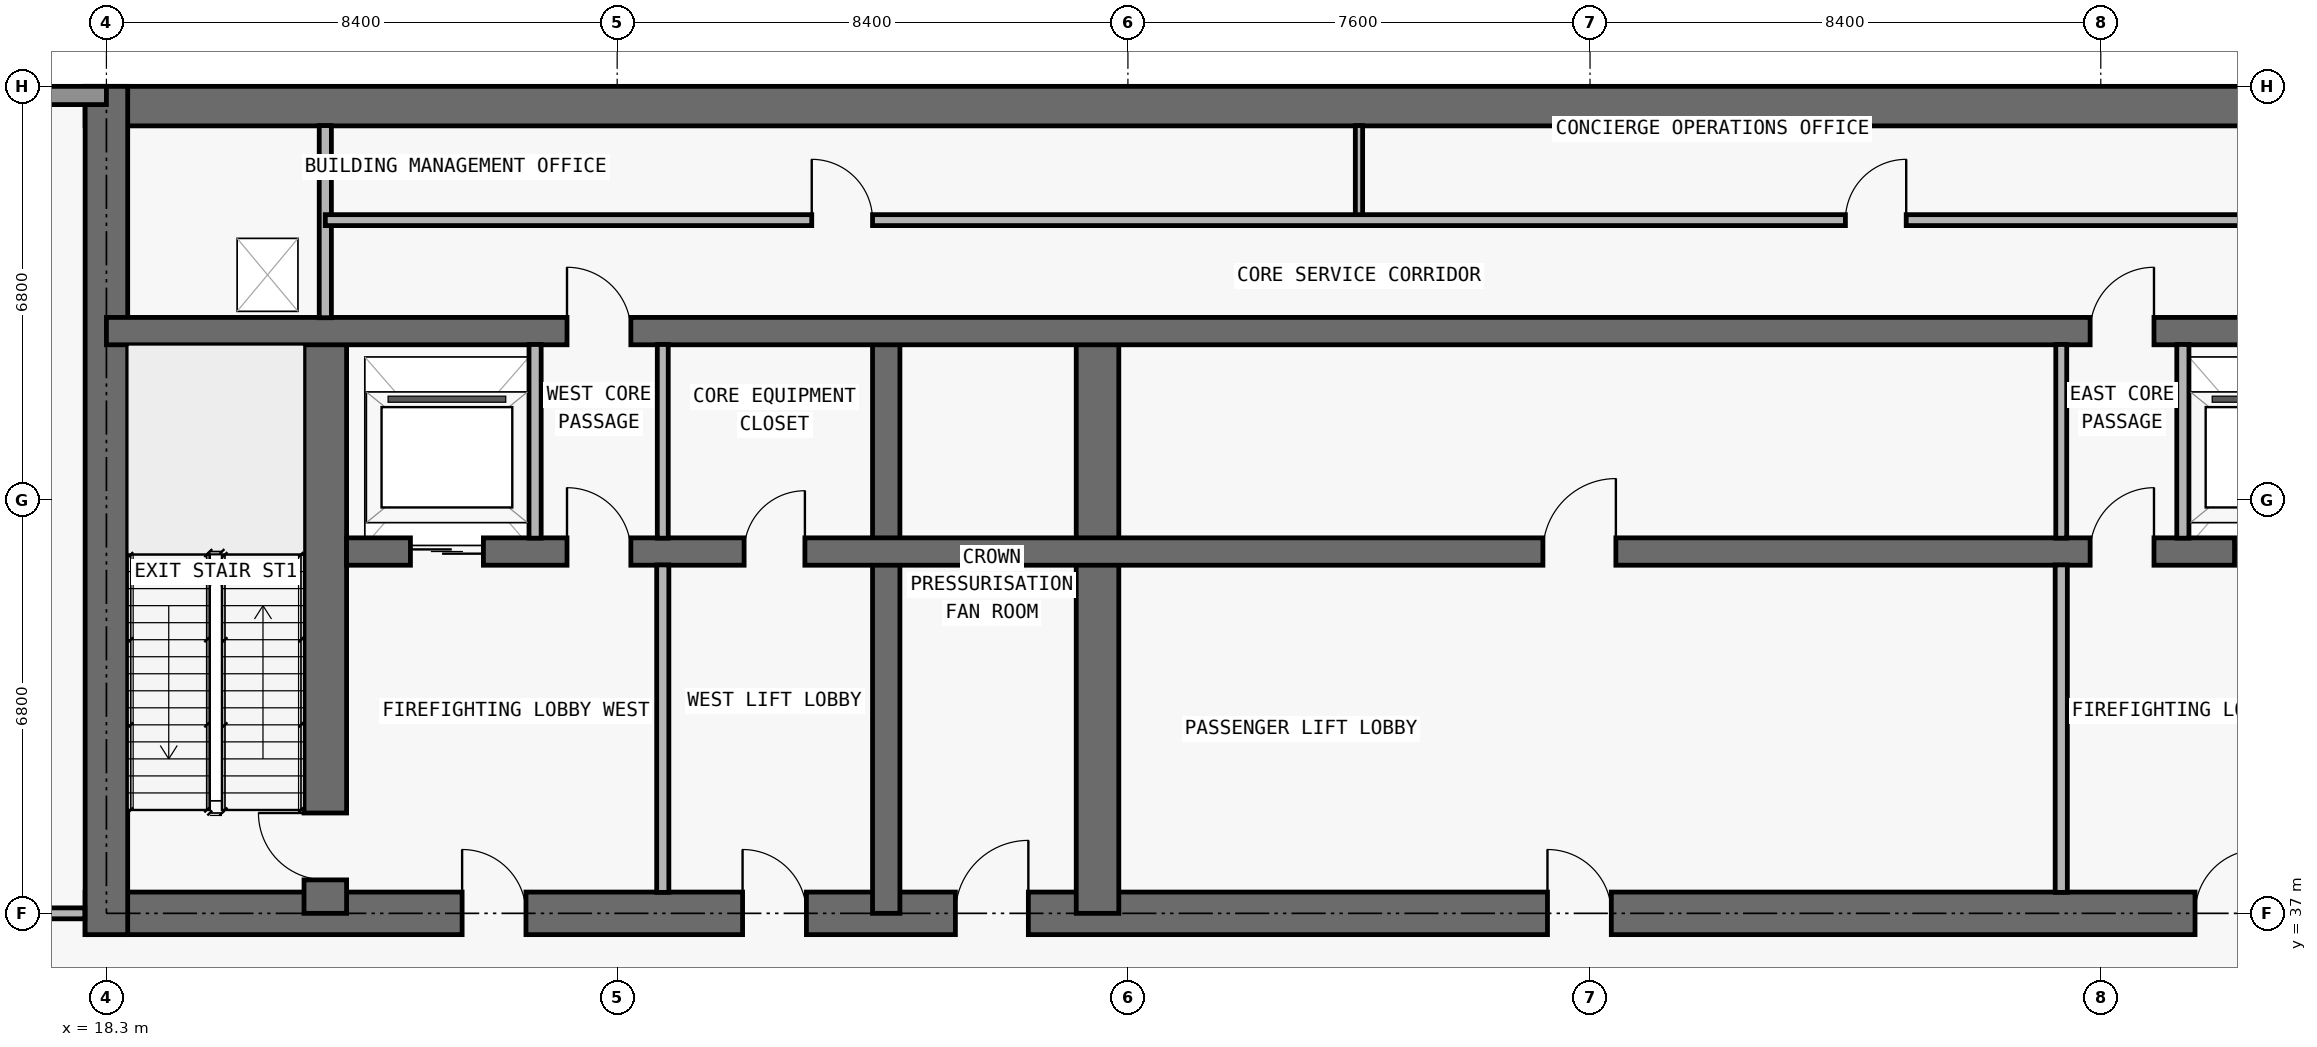
"""IFC4 building model, lengths in metres.
Left out: names, types, materials, properties, quantities, classifications, styles, units other than length and angle.
Written with IfcOpenShell. Run it as: python <this file> out.ifc"""

import sys

from ifc_helpers import new_model, si_unit, direction, frame, frame_2d, origin, place, context, subcontext, project, spatial, rectangle, extrude, element, fill, save


model = new_model("IFC4")
c1 = context("Model", 3, precision=1e-05, world=origin(), true_north=direction((0.0, 1.0)))
c2 = subcontext(c1, "Body", "Model", "MODEL_VIEW")
j1 = project(units=[si_unit("LENGTHUNIT", "METRE"), si_unit("PLANEANGLEUNIT", "RADIAN")], contexts=[c1])
p1 = place(None, origin())
s1 = spatial("IfcSite", under=j1, at=p1, CompositionType="ELEMENT")
p2 = place(p1, origin())
s2 = spatial("IfcBuilding", under=s1, at=p2, CompositionType="ELEMENT")
p3 = place(p2, frame((0.0, 0.0, 284.8)))
s3 = spatial("IfcBuildingStorey", under=s2, at=p3, CompositionType="ELEMENT", Elevation=284.8)
p4 = place(p3, frame((17.95, 37.0, 0.0), z_axis=(0.0, 0.0, 1.0), x_axis=(1.0, 0.0, 0.0)))
e1 = element("IfcWall", 1, at=p4, inside=s3, PredefinedType="SHEAR", context=c2, shape_type="SweptSolid", body=[
    extrude(rectangle(XDim=41.9, YDim=0.7, at=frame_2d((20.95, 0.0))), origin(), (0.0, 0.0, 1.0), 5.1),
])
p5 = place(p4, frame((14.312, 0.0, 0.0)))
e2 = element("IfcOpeningElement", 2, at=p5, cuts=e1, PredefinedType="OPENING", context=c2, shape_type="SweptSolid", body=[
    extrude(rectangle(XDim=1.2, YDim=2.2, at=frame_2d((0.6, 1.1))), frame((0.0, 0.36, 0.0), z_axis=(0.0, -1.0, 0.0), x_axis=(1.0, 0.0, 0.0)), (0.0, 0.0, 1.0), 0.72),
])
p6 = place(p4, frame((6.2, 0.0, 0.0)))
e3 = element("IfcOpeningElement", 3, at=p6, cuts=e1, PredefinedType="OPENING", context=c2, shape_type="SweptSolid", body=[
    extrude(rectangle(XDim=1.05, YDim=2.15, at=frame_2d((0.525, 1.075))), frame((0.0, 0.36, 0.0), z_axis=(0.0, -1.0, 0.0), x_axis=(1.0, 0.0, 0.0)), (0.0, 0.0, 1.0), 0.72),
])
p7 = place(p4, frame((34.7, 0.0, 0.0)))
e4 = element("IfcOpeningElement", 4, at=p7, cuts=e1, PredefinedType="OPENING", context=c2, shape_type="SweptSolid", body=[
    extrude(rectangle(XDim=1.05, YDim=2.15, at=frame_2d((0.525, 1.075))), frame((0.0, 0.36, 0.0), z_axis=(0.0, -1.0, 0.0), x_axis=(1.0, 0.0, 0.0)), (0.0, 0.0, 1.0), 0.72),
])
p8 = place(p4, frame((10.812, 0.0, 0.0)))
e5 = element("IfcOpeningElement", 5, at=p8, cuts=e1, PredefinedType="OPENING", context=c2, shape_type="SweptSolid", body=[
    extrude(rectangle(XDim=1.05, YDim=2.15, at=frame_2d((0.525, 1.075))), frame((0.0, 0.36, 0.0), z_axis=(0.0, -1.0, 0.0), x_axis=(1.0, 0.0, 0.0)), (0.0, 0.0, 1.0), 0.72),
])
p9 = place(p4, frame((24.05, 0.0, 0.0)))
e6 = element("IfcOpeningElement", 6, at=p9, cuts=e1, PredefinedType="OPENING", context=c2, shape_type="SweptSolid", body=[
    extrude(rectangle(XDim=1.05, YDim=2.15, at=frame_2d((0.525, 1.075))), frame((0.0, 0.36, 0.0), z_axis=(0.0, -1.0, 0.0), x_axis=(1.0, 0.0, 0.0)), (0.0, 0.0, 1.0), 0.72),
])
p10 = place(p3, frame((17.95, 50.275, 0.0), z_axis=(0.0, 0.0, 1.0), x_axis=(1.0, 0.0, 0.0)))
e7 = element("IfcWall", 7, at=p10, inside=s3, PredefinedType="SHEAR", context=c2, shape_type="SweptSolid", body=[
    extrude(rectangle(XDim=41.9, YDim=0.65, at=frame_2d((20.95, 0.0))), origin(), (0.0, 0.0, 1.0), 5.1),
])
p11 = place(p3, frame((18.3, 36.65, 0.0), z_axis=(0.0, 0.0, 1.0), x_axis=(0.0, 1.0, 0.0)))
e8 = element("IfcWall", 8, at=p11, inside=s3, PredefinedType="SHEAR", context=c2, shape_type="SweptSolid", body=[
    extrude(rectangle(XDim=13.95, YDim=0.7, at=frame_2d((6.975, 0.0))), origin(), (0.0, 0.0, 1.0), 5.1),
])
p12 = place(p3, frame((21.9, 37.0, 0.0), z_axis=(0.0, 0.0, 1.0), x_axis=(0.0, 1.0, 0.0)))
e9 = element("IfcWall", 9, at=p12, inside=s3, PredefinedType="SHEAR", context=c2, shape_type="SweptSolid", body=[
    extrude(rectangle(XDim=9.575, YDim=0.7, at=frame_2d((4.788, 0.0))), origin(), (0.0, 0.0, 1.0), 5.1),
])
p13 = place(p12, frame((0.55, 0.0, 0.0)))
e10 = element("IfcOpeningElement", 10, at=p13, cuts=e9, PredefinedType="OPENING", context=c2, shape_type="SweptSolid", body=[
    extrude(rectangle(XDim=1.1, YDim=2.15, at=frame_2d((0.55, 1.075))), frame((0.0, 0.36, 0.0), z_axis=(0.0, -1.0, 0.0), x_axis=(1.0, 0.0, 0.0)), (0.0, 0.0, 1.0), 0.72),
])
p14 = place(p3, frame((31.125, 37.0, 0.0), z_axis=(0.0, 0.0, 1.0), x_axis=(0.0, 1.0, 0.0)))
e11 = element("IfcWall", 11, at=p14, inside=s3, PredefinedType="SHEAR", context=c2, shape_type="SweptSolid", body=[
    extrude(rectangle(XDim=9.575, YDim=0.45, at=frame_2d((4.788, 0.0))), origin(), (0.0, 0.0, 1.0), 5.1),
])
p15 = place(p3, frame((34.6, 37.0, 0.0), z_axis=(0.0, 0.0, 1.0), x_axis=(0.0, 1.0, 0.0)))
e12 = element("IfcWall", 12, at=p15, inside=s3, PredefinedType="SHEAR", context=c2, shape_type="SweptSolid", body=[
    extrude(rectangle(XDim=9.575, YDim=0.7, at=frame_2d((4.788, 0.0))), origin(), (0.0, 0.0, 1.0), 5.1),
])
p16 = place(p3, frame((22.25, 42.95, 0.0), z_axis=(0.0, 0.0, 1.0), x_axis=(1.0, 0.0, 0.0)))
e13 = element("IfcWall", 13, at=p16, inside=s3, PredefinedType="SHEAR", context=c2, shape_type="SweptSolid", body=[
    extrude(rectangle(XDim=33.3, YDim=0.45, at=frame_2d((16.65, 0.0))), origin(), (0.0, 0.0, 1.0), 5.1),
])
p17 = place(p16, frame((1.05, 0.0, 0.0)))
e14 = element("IfcOpeningElement", 14, at=p17, cuts=e13, PredefinedType="OPENING", context=c2, shape_type="SweptSolid", body=[
    extrude(rectangle(XDim=1.2, YDim=2.2, at=frame_2d((0.6, 1.1))), frame((0.0, 0.235, 0.0), z_axis=(0.0, -1.0, 0.0), x_axis=(1.0, 0.0, 0.0)), (0.0, 0.0, 1.0), 0.47),
])
p18 = place(p16, frame((31.05, 0.0, 0.0)))
e15 = element("IfcOpeningElement", 15, at=p18, cuts=e13, PredefinedType="OPENING", context=c2, shape_type="SweptSolid", body=[
    extrude(rectangle(XDim=1.2, YDim=2.2, at=frame_2d((0.6, 1.1))), frame((0.0, 0.235, 0.0), z_axis=(0.0, -1.0, 0.0), x_axis=(1.0, 0.0, 0.0)), (0.0, 0.0, 1.0), 0.47),
])
p19 = place(p16, frame((3.625, 0.0, 0.0)))
e16 = element("IfcOpeningElement", 16, at=p19, cuts=e13, PredefinedType="OPENING", context=c2, shape_type="SweptSolid", body=[
    extrude(rectangle(XDim=1.05, YDim=2.15, at=frame_2d((0.525, 1.075))), frame((0.0, 0.235, 0.0), z_axis=(0.0, -1.0, 0.0), x_axis=(1.0, 0.0, 0.0)), (0.0, 0.0, 1.0), 0.47),
])
p20 = place(p16, frame((28.675, 0.0, 0.0)))
e17 = element("IfcOpeningElement", 17, at=p20, cuts=e13, PredefinedType="OPENING", context=c2, shape_type="SweptSolid", body=[
    extrude(rectangle(XDim=1.05, YDim=2.15, at=frame_2d((0.525, 1.075))), frame((0.0, 0.235, 0.0), z_axis=(0.0, -1.0, 0.0), x_axis=(1.0, 0.0, 0.0)), (0.0, 0.0, 1.0), 0.47),
])
p21 = place(p16, frame((6.538, 0.0, 0.0)))
e18 = element("IfcOpeningElement", 18, at=p21, cuts=e13, PredefinedType="OPENING", context=c2, shape_type="SweptSolid", body=[
    extrude(rectangle(XDim=1.0, YDim=2.2, at=frame_2d((0.5, 1.1))), frame((0.0, 0.235, 0.0), z_axis=(0.0, -1.0, 0.0), x_axis=(1.0, 0.0, 0.0)), (0.0, 0.0, 1.0), 0.47),
])
p22 = place(p16, frame((19.675, 0.0, 0.0)))
e19 = element("IfcOpeningElement", 19, at=p22, cuts=e13, PredefinedType="OPENING", context=c2, shape_type="SweptSolid", body=[
    extrude(rectangle(XDim=1.2, YDim=2.2, at=frame_2d((0.6, 1.1))), frame((0.0, 0.235, 0.0), z_axis=(0.0, -1.0, 0.0), x_axis=(1.0, 0.0, 0.0)), (0.0, 0.0, 1.0), 0.47),
])
p23 = place(p3, frame((18.3, 46.575, 0.0), z_axis=(0.0, 0.0, 1.0), x_axis=(1.0, 0.0, 0.0)))
e20 = element("IfcWall", 20, at=p23, inside=s3, PredefinedType="SHEAR", context=c2, shape_type="SweptSolid", body=[
    extrude(rectangle(XDim=41.2, YDim=0.45, at=frame_2d((20.6, 0.0))), origin(), (0.0, 0.0, 1.0), 5.1),
])
p24 = place(p23, frame((7.575, 0.0, 0.0)))
e21 = element("IfcOpeningElement", 21, at=p24, cuts=e20, PredefinedType="OPENING", context=c2, shape_type="SweptSolid", body=[
    extrude(rectangle(XDim=1.05, YDim=2.15, at=frame_2d((0.525, 1.075))), frame((0.0, 0.235, 0.0), z_axis=(0.0, -1.0, 0.0), x_axis=(1.0, 0.0, 0.0)), (0.0, 0.0, 1.0), 0.47),
])
p25 = place(p23, frame((32.625, 0.0, 0.0)))
e22 = element("IfcOpeningElement", 22, at=p25, cuts=e20, PredefinedType="OPENING", context=c2, shape_type="SweptSolid", body=[
    extrude(rectangle(XDim=1.05, YDim=2.15, at=frame_2d((0.525, 1.075))), frame((0.0, 0.235, 0.0), z_axis=(0.0, -1.0, 0.0), x_axis=(1.0, 0.0, 0.0)), (0.0, 0.0, 1.0), 0.47),
])
p26 = place(p3, frame((16.5, 50.45, 0.0), z_axis=(0.0, 0.0, 1.0), x_axis=(1.0, 0.0, 0.0)))
e23 = element("IfcWall", 23, at=p26, inside=s3, PredefinedType="STANDARD", context=c2, shape_type="SweptSolid", body=[
    extrude(rectangle(XDim=1.8, YDim=0.3, at=frame_2d((0.9, 0.0))), origin(), (0.0, 0.0, 1.0), 5.1),
])
p27 = place(p3, frame((21.9, 46.795, 0.0), z_axis=(0.0, 0.0, 1.0), x_axis=(0.0, 1.0, 0.0)))
e24 = element("IfcWall", 24, at=p27, inside=s3, PredefinedType="PARTITIONING", context=c2, shape_type="SweptSolid", body=[
    extrude(rectangle(XDim=3.16, YDim=0.2, at=frame_2d((1.58, 0.0))), origin(), (0.0, 0.0, 1.0), 5.1),
])
p28 = place(p3, frame((25.35, 43.17, 0.0), z_axis=(0.0, 0.0, 1.0), x_axis=(0.0, 1.0, 0.0)))
e25 = element("IfcWall", 25, at=p28, inside=s3, PredefinedType="PARTITIONING", context=c2, shape_type="SweptSolid", body=[
    extrude(rectangle(XDim=3.185, YDim=0.2, at=frame_2d((1.593, 0.0))), origin(), (0.0, 0.0, 1.0), 5.1),
])
p29 = place(p3, frame((27.45, 37.345, 0.0), z_axis=(0.0, 0.0, 1.0), x_axis=(0.0, 1.0, 0.0)))
e26 = element("IfcWall", 26, at=p29, inside=s3, PredefinedType="PARTITIONING", context=c2, shape_type="SweptSolid", body=[
    extrude(rectangle(XDim=5.385, YDim=0.2, at=frame_2d((2.692, 0.0))), origin(), (0.0, 0.0, 1.0), 5.1),
])
p30 = place(p3, frame((27.45, 43.17, 0.0), z_axis=(0.0, 0.0, 1.0), x_axis=(0.0, 1.0, 0.0)))
e27 = element("IfcWall", 27, at=p30, inside=s3, PredefinedType="PARTITIONING", context=c2, shape_type="SweptSolid", body=[
    extrude(rectangle(XDim=3.185, YDim=0.18, at=frame_2d((1.593, 0.0))), origin(), (0.0, 0.0, 1.0), 5.1),
])
p31 = place(p3, frame((38.9, 48.4, 0.0), z_axis=(0.0, 0.0, 1.0), x_axis=(0.0, 1.0, 0.0)))
e28 = element("IfcWall", 28, at=p31, inside=s3, PredefinedType="PARTITIONING", context=c2, shape_type="SweptSolid", body=[
    extrude(rectangle(XDim=1.555, YDim=0.12, at=frame_2d((0.778, 0.0))), origin(), (0.0, 0.0, 1.0), 5.1),
])
p32 = place(p3, frame((50.45, 37.345, 0.0), z_axis=(0.0, 0.0, 1.0), x_axis=(0.0, 1.0, 0.0)))
e29 = element("IfcWall", 29, at=p32, inside=s3, PredefinedType="PARTITIONING", context=c2, shape_type="SweptSolid", body=[
    extrude(rectangle(XDim=5.385, YDim=0.2, at=frame_2d((2.692, 0.0))), origin(), (0.0, 0.0, 1.0), 5.1),
])
p33 = place(p3, frame((50.45, 43.17, 0.0), z_axis=(0.0, 0.0, 1.0), x_axis=(0.0, 1.0, 0.0)))
e30 = element("IfcWall", 30, at=p33, inside=s3, PredefinedType="PARTITIONING", context=c2, shape_type="SweptSolid", body=[
    extrude(rectangle(XDim=3.185, YDim=0.18, at=frame_2d((1.593, 0.0))), origin(), (0.0, 0.0, 1.0), 5.1),
])
p34 = place(p3, frame((52.45, 43.17, 0.0), z_axis=(0.0, 0.0, 1.0), x_axis=(0.0, 1.0, 0.0)))
e31 = element("IfcWall", 31, at=p34, inside=s3, PredefinedType="PARTITIONING", context=c2, shape_type="SweptSolid", body=[
    extrude(rectangle(XDim=3.185, YDim=0.2, at=frame_2d((1.593, 0.0))), origin(), (0.0, 0.0, 1.0), 5.1),
])
p35 = place(p3, frame((16.5, 37.0, 0.0), z_axis=(0.0, 0.0, 1.0), x_axis=(1.0, 0.0, 0.0)))
e32 = element("IfcWall", 32, at=p35, inside=s3, PredefinedType="PARTITIONING", context=c2, shape_type="SweptSolid", body=[
    extrude(rectangle(XDim=1.445, YDim=0.18, at=frame_2d((0.723, 0.0))), origin(), (0.0, 0.0, 1.0), 5.1),
])
p36 = place(p3, frame((21.9, 48.4, 0.0), z_axis=(0.0, 0.0, 1.0), x_axis=(1.0, 0.0, 0.0)))
e33 = element("IfcWall", 33, at=p36, inside=s3, PredefinedType="PARTITIONING", context=c2, shape_type="SweptSolid", body=[
    extrude(rectangle(XDim=34.0, YDim=0.18, at=frame_2d((17.0, 0.0))), origin(), (0.0, 0.0, 1.0), 5.1),
])
p37 = place(p36, frame((8.0, 0.0, 0.0)))
e34 = element("IfcOpeningElement", 34, at=p37, cuts=e33, PredefinedType="OPENING", context=c2, shape_type="SweptSolid", body=[
    extrude(rectangle(XDim=1.0, YDim=2.2, at=frame_2d((0.5, 1.1))), frame((0.0, 0.1, 0.0), z_axis=(0.0, -1.0, 0.0), x_axis=(1.0, 0.0, 0.0)), (0.0, 0.0, 1.0), 0.2),
])
p38 = place(p36, frame((25.0, 0.0, 0.0)))
e35 = element("IfcOpeningElement", 35, at=p38, cuts=e33, PredefinedType="OPENING", context=c2, shape_type="SweptSolid", body=[
    extrude(rectangle(XDim=1.0, YDim=2.2, at=frame_2d((0.5, 1.1))), frame((0.0, 0.1, 0.0), z_axis=(0.0, -1.0, 0.0), x_axis=(1.0, 0.0, 0.0)), (0.0, 0.0, 1.0), 0.2),
])
p39 = place(p17, origin())
e36 = element("IfcDoor", 36, at=p39, inside=s3, OperationType="DOUBLE_DOOR_SLIDING", PredefinedType="DOOR", context=c2, shape_type="SweptSolid", body=[
    extrude(rectangle(XDim=1.2, YDim=2.2, at=frame_2d((0.6, 1.1))), frame((0.0, 0.025, 0.0), z_axis=(0.0, -1.0, 0.0), x_axis=(1.0, 0.0, 0.0)), (0.0, 0.0, 1.0), 0.05),
])
fill(e14, e36)
p40 = place(p18, origin())
e37 = element("IfcDoor", 37, at=p40, inside=s3, OperationType="DOUBLE_DOOR_SLIDING", PredefinedType="DOOR", context=c2, shape_type="SweptSolid", body=[
    extrude(rectangle(XDim=1.2, YDim=2.2, at=frame_2d((0.6, 1.1))), frame((0.0, 0.025, 0.0), z_axis=(0.0, -1.0, 0.0), x_axis=(1.0, 0.0, 0.0)), (0.0, 0.0, 1.0), 0.05),
])
fill(e15, e37)
p41 = place(p5, origin())
e38 = element("IfcDoor", 38, at=p41, inside=s3, OperationType="SINGLE_SWING_RIGHT", PredefinedType="DOOR", context=c2, shape_type="SweptSolid", body=[
    extrude(rectangle(XDim=1.2, YDim=2.2, at=frame_2d((0.6, 1.1))), frame((0.0, 0.025, 0.0), z_axis=(0.0, -1.0, 0.0), x_axis=(1.0, 0.0, 0.0)), (0.0, 0.0, 1.0), 0.05),
])
fill(e2, e38)
p42 = place(p6, origin())
e39 = element("IfcDoor", 39, at=p42, inside=s3, OperationType="SINGLE_SWING_LEFT", PredefinedType="DOOR", context=c2, shape_type="SweptSolid", body=[
    extrude(rectangle(XDim=1.05, YDim=2.15, at=frame_2d((0.525, 1.075))), frame((0.0, 0.025, 0.0), z_axis=(0.0, -1.0, 0.0), x_axis=(1.0, 0.0, 0.0)), (0.0, 0.0, 1.0), 0.05),
])
fill(e3, e39)
p43 = place(p13, origin())
e40 = element("IfcDoor", 40, at=p43, inside=s3, OperationType="SINGLE_SWING_RIGHT", PredefinedType="DOOR", context=c2, shape_type="SweptSolid", body=[
    extrude(rectangle(XDim=1.1, YDim=2.15, at=frame_2d((0.55, 1.075))), frame((0.0, 0.025, 0.0), z_axis=(0.0, -1.0, 0.0), x_axis=(1.0, 0.0, 0.0)), (0.0, 0.0, 1.0), 0.05),
])
fill(e10, e40)
p44 = place(p19, origin())
e41 = element("IfcDoor", 41, at=p44, inside=s3, OperationType="SINGLE_SWING_LEFT", PredefinedType="DOOR", context=c2, shape_type="SweptSolid", body=[
    extrude(rectangle(XDim=1.05, YDim=2.15, at=frame_2d((0.525, 1.075))), frame((0.0, 0.025, 0.0), z_axis=(0.0, -1.0, 0.0), x_axis=(1.0, 0.0, 0.0)), (0.0, 0.0, 1.0), 0.05),
])
fill(e16, e41)
p45 = place(p7, origin())
e42 = element("IfcDoor", 42, at=p45, inside=s3, OperationType="SINGLE_SWING_RIGHT", PredefinedType="DOOR", context=c2, shape_type="SweptSolid", body=[
    extrude(rectangle(XDim=1.05, YDim=2.15, at=frame_2d((0.525, 1.075))), frame((0.0, 0.025, 0.0), z_axis=(0.0, -1.0, 0.0), x_axis=(1.0, 0.0, 0.0)), (0.0, 0.0, 1.0), 0.05),
])
fill(e4, e42)
p46 = place(p20, origin())
e43 = element("IfcDoor", 43, at=p46, inside=s3, OperationType="SINGLE_SWING_RIGHT", PredefinedType="DOOR", context=c2, shape_type="SweptSolid", body=[
    extrude(rectangle(XDim=1.05, YDim=2.15, at=frame_2d((0.525, 1.075))), frame((0.0, 0.025, 0.0), z_axis=(0.0, -1.0, 0.0), x_axis=(1.0, 0.0, 0.0)), (0.0, 0.0, 1.0), 0.05),
])
fill(e17, e43)
p47 = place(p8, origin())
e44 = element("IfcDoor", 44, at=p47, inside=s3, OperationType="SINGLE_SWING_LEFT", PredefinedType="DOOR", context=c2, shape_type="SweptSolid", body=[
    extrude(rectangle(XDim=1.05, YDim=2.15, at=frame_2d((0.525, 1.075))), frame((0.0, 0.025, 0.0), z_axis=(0.0, -1.0, 0.0), x_axis=(1.0, 0.0, 0.0)), (0.0, 0.0, 1.0), 0.05),
])
fill(e5, e44)
p48 = place(p21, origin())
e45 = element("IfcDoor", 45, at=p48, inside=s3, OperationType="SINGLE_SWING_RIGHT", PredefinedType="DOOR", context=c2, shape_type="SweptSolid", body=[
    extrude(rectangle(XDim=1.0, YDim=2.2, at=frame_2d((0.5, 1.1))), frame((0.0, 0.025, 0.0), z_axis=(0.0, -1.0, 0.0), x_axis=(1.0, 0.0, 0.0)), (0.0, 0.0, 1.0), 0.05),
])
fill(e18, e45)
p49 = place(p9, origin())
e46 = element("IfcDoor", 46, at=p49, inside=s3, OperationType="SINGLE_SWING_LEFT", PredefinedType="DOOR", context=c2, shape_type="SweptSolid", body=[
    extrude(rectangle(XDim=1.05, YDim=2.15, at=frame_2d((0.525, 1.075))), frame((0.0, 0.025, 0.0), z_axis=(0.0, -1.0, 0.0), x_axis=(1.0, 0.0, 0.0)), (0.0, 0.0, 1.0), 0.05),
])
fill(e6, e46)
p50 = place(p22, origin())
e47 = element("IfcDoor", 47, at=p50, inside=s3, OperationType="SINGLE_SWING_RIGHT", PredefinedType="DOOR", context=c2, shape_type="SweptSolid", body=[
    extrude(rectangle(XDim=1.2, YDim=2.2, at=frame_2d((0.6, 1.1))), frame((0.0, 0.025, 0.0), z_axis=(0.0, -1.0, 0.0), x_axis=(1.0, 0.0, 0.0)), (0.0, 0.0, 1.0), 0.05),
])
fill(e19, e47)
p51 = place(p24, origin())
e48 = element("IfcDoor", 48, at=p51, inside=s3, OperationType="SINGLE_SWING_LEFT", PredefinedType="DOOR", context=c2, shape_type="SweptSolid", body=[
    extrude(rectangle(XDim=1.05, YDim=2.15, at=frame_2d((0.525, 1.075))), frame((0.0, 0.025, 0.0), z_axis=(0.0, -1.0, 0.0), x_axis=(1.0, 0.0, 0.0)), (0.0, 0.0, 1.0), 0.05),
])
fill(e21, e48)
p52 = place(p25, origin())
e49 = element("IfcDoor", 49, at=p52, inside=s3, OperationType="SINGLE_SWING_RIGHT", PredefinedType="DOOR", context=c2, shape_type="SweptSolid", body=[
    extrude(rectangle(XDim=1.05, YDim=2.15, at=frame_2d((0.525, 1.075))), frame((0.0, 0.025, 0.0), z_axis=(0.0, -1.0, 0.0), x_axis=(1.0, 0.0, 0.0)), (0.0, 0.0, 1.0), 0.05),
])
fill(e22, e49)
p53 = place(p37, origin())
e50 = element("IfcDoor", 50, at=p53, inside=s3, OperationType="SINGLE_SWING_LEFT", PredefinedType="DOOR", context=c2, shape_type="SweptSolid", body=[
    extrude(rectangle(XDim=1.0, YDim=2.2, at=frame_2d((0.5, 1.1))), frame((0.0, 0.025, 0.0), z_axis=(0.0, -1.0, 0.0), x_axis=(1.0, 0.0, 0.0)), (0.0, 0.0, 1.0), 0.05),
])
fill(e34, e50)
p54 = place(p38, origin())
e51 = element("IfcDoor", 51, at=p54, inside=s3, OperationType="SINGLE_SWING_RIGHT", PredefinedType="DOOR", context=c2, shape_type="SweptSolid", body=[
    extrude(rectangle(XDim=1.0, YDim=2.2, at=frame_2d((0.5, 1.1))), frame((0.0, 0.025, 0.0), z_axis=(0.0, -1.0, 0.0), x_axis=(1.0, 0.0, 0.0)), (0.0, 0.0, 1.0), 0.05),
])
fill(e35, e51)
save(model, sys.argv[1])
